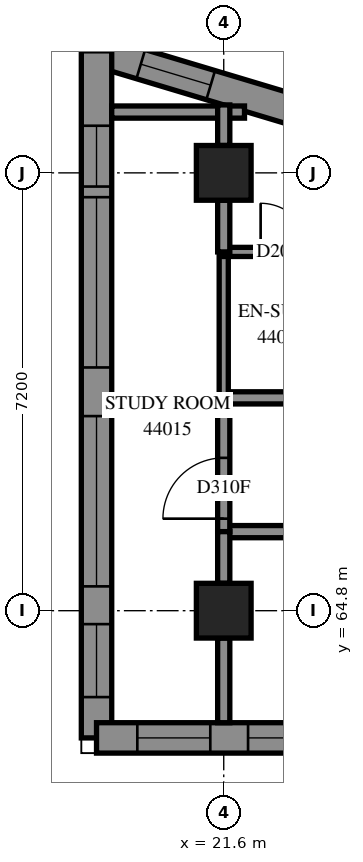
"""IFC4 building model, lengths in metres.
Left out: names, types, materials, properties, quantities, classifications, styles, units other than length and angle.
Written with IfcOpenShell. Run it as: python <this file> out.ifc"""

import sys

from ifc_helpers import new_model, si_unit, direction, frame, frame_2d, origin, origin_2d, place, context, subcontext, project, spatial, polyline, rectangle, outline, extrude, element, fill, save


model = new_model("IFC4")
c1 = context("Model", 3, precision=1e-05, world=origin(), true_north=direction((0.0, 1.0)))
c2 = subcontext(c1, "Body", "Model", "MODEL_VIEW")
j1 = project(units=[si_unit("LENGTHUNIT", "METRE"), si_unit("PLANEANGLEUNIT", "RADIAN")], contexts=[c1])
p1 = place(None, origin())
s1 = spatial("IfcSite", under=j1, at=p1, CompositionType="ELEMENT")
p2 = place(p1, origin())
s2 = spatial("IfcBuilding", under=s1, at=p2, CompositionType="ELEMENT")
p3 = place(p2, frame((0.0, 0.0, 162.6)))
s3 = spatial("IfcBuildingStorey", under=s2, at=p3, CompositionType="ELEMENT", Elevation=162.6)
for number, where, z_axis, x_axis in (
    (1, (21.6, 64.8, 0.0), (0.0, 0.0, 1.0), (1.0, 0.0, 0.0)),
    (2, (21.6, 72.0, 0.0), (0.0, 0.0, 1.0), (1.0, 0.0, 0.0)),
):
    element("IfcColumn", number, at=place(p3, frame(where, z_axis=z_axis, x_axis=x_axis)), inside=s3, PredefinedType="COLUMN", context=c2, shape_type="SweptSolid", body=[
        extrude(rectangle(XDim=0.9, YDim=0.9, at=origin_2d()), origin(), (0.0, 0.0, 1.0), 3.1),
    ])
p4 = place(p3, frame((23.046, 72.945, 0.0), z_axis=(0.0, 0.0, 1.0), x_axis=(-0.9578292658, 0.2873379501, 0.0)))
e3 = element("IfcWall", 3, at=p4, inside=s3, PredefinedType="SOLIDWALL", context=c2, shape_type="SweptSolid", body=[
    extrude(outline(polyline([(0.055, -0.25), (4.03, -0.25), (3.358, 0.25), (-0.055, 0.25), (0.055, -0.25)])), origin(), (0.0, 0.0, 1.0), 3.1),
])
p5 = place(p4, frame((1.734, 0.0, 0.45)))
e4 = element("IfcOpeningElement", 4, at=p5, cuts=e3, PredefinedType="OPENING", context=c2, shape_type="SweptSolid", body=[
    extrude(rectangle(XDim=1.2, YDim=2.5, at=frame_2d((0.6, 1.25))), frame((0.0, 0.26, 0.0), z_axis=(0.0, -1.0, 0.0), x_axis=(1.0, 0.0, 0.0)), (0.0, 0.0, 1.0), 0.52),
])
p6 = place(p3, frame((19.508, 74.006, 0.0), z_axis=(0.0, 0.0, 1.0), x_axis=(0.0, -1.0, 0.0)))
e5 = element("IfcWall", 5, at=p6, inside=s3, PredefinedType="SOLIDWALL", context=c2, shape_type="SweptSolid", body=[
    extrude(outline(polyline([(-0.336, -0.25), (11.548, -0.25), (11.048, 0.25), (0.336, 0.25), (-0.336, -0.25)])), origin(), (0.0, 0.0, 1.0), 3.1),
])
p7 = place(p6, frame((2.406, 0.0, 0.45)))
e6 = element("IfcOpeningElement", 6, at=p7, cuts=e5, PredefinedType="OPENING", context=c2, shape_type="SweptSolid", body=[
    extrude(rectangle(XDim=2.8, YDim=2.5, at=frame_2d((1.4, 1.25))), frame((0.0, 0.26, 0.0), z_axis=(0.0, -1.0, 0.0), x_axis=(1.0, 0.0, 0.0)), (0.0, 0.0, 1.0), 0.52),
])
p8 = place(p6, frame((6.006, 0.0, 0.45)))
e7 = element("IfcOpeningElement", 7, at=p8, cuts=e5, PredefinedType="OPENING", context=c2, shape_type="SweptSolid", body=[
    extrude(rectangle(XDim=2.8, YDim=2.5, at=frame_2d((1.4, 1.25))), frame((0.0, 0.26, 0.0), z_axis=(0.0, -1.0, 0.0), x_axis=(1.0, 0.0, 0.0)), (0.0, 0.0, 1.0), 0.52),
])
p9 = place(p6, frame((9.427, 0.0, 0.45)))
e8 = element("IfcOpeningElement", 8, at=p9, cuts=e5, PredefinedType="OPENING", context=c2, shape_type="SweptSolid", body=[
    extrude(rectangle(XDim=1.2, YDim=2.5, at=frame_2d((0.6, 1.25))), frame((0.0, 0.26, 0.0), z_axis=(0.0, -1.0, 0.0), x_axis=(1.0, 0.0, 0.0)), (0.0, 0.0, 1.0), 0.52),
])
p10 = place(p6, frame((1.231, 0.0, 0.45)))
e9 = element("IfcOpeningElement", 9, at=p10, cuts=e5, PredefinedType="OPENING", context=c2, shape_type="SweptSolid", body=[
    extrude(rectangle(XDim=1.0, YDim=2.5, at=frame_2d((0.5, 1.25))), frame((0.0, 0.26, 0.0), z_axis=(0.0, -1.0, 0.0), x_axis=(1.0, 0.0, 0.0)), (0.0, 0.0, 1.0), 0.52),
])
p11 = place(p3, frame((19.508, 62.708, 0.0), z_axis=(0.0, 0.0, 1.0), x_axis=(1.0, 0.0, 0.0)))
e10 = element("IfcWall", 10, at=p11, inside=s3, PredefinedType="SOLIDWALL", context=c2, shape_type="SweptSolid", body=[
    extrude(outline(polyline([(-0.25, -0.25), (15.292, -0.25), (15.792, 0.25), (0.25, 0.25), (-0.25, -0.25)])), origin(), (0.0, 0.0, 1.0), 3.1),
])
p12 = place(p11, frame((2.492, 0.0, 0.45)))
e11 = element("IfcOpeningElement", 11, at=p12, cuts=e10, PredefinedType="OPENING", context=c2, shape_type="SweptSolid", body=[
    extrude(rectangle(XDim=2.8, YDim=2.5, at=frame_2d((1.4, 1.25))), frame((0.0, 0.26, 0.0), z_axis=(0.0, -1.0, 0.0), x_axis=(1.0, 0.0, 0.0)), (0.0, 0.0, 1.0), 0.52),
])
p13 = place(p11, frame((6.092, 0.0, 0.45)))
e12 = element("IfcOpeningElement", 12, at=p13, cuts=e10, PredefinedType="OPENING", context=c2, shape_type="SweptSolid", body=[
    extrude(rectangle(XDim=2.8, YDim=2.5, at=frame_2d((1.4, 1.25))), frame((0.0, 0.26, 0.0), z_axis=(0.0, -1.0, 0.0), x_axis=(1.0, 0.0, 0.0)), (0.0, 0.0, 1.0), 0.52),
])
p14 = place(p11, frame((9.442, 0.0, 0.45)))
e13 = element("IfcOpeningElement", 13, at=p14, cuts=e10, PredefinedType="OPENING", context=c2, shape_type="SweptSolid", body=[
    extrude(rectangle(XDim=2.8, YDim=2.5, at=frame_2d((1.4, 1.25))), frame((0.0, 0.26, 0.0), z_axis=(0.0, -1.0, 0.0), x_axis=(1.0, 0.0, 0.0)), (0.0, 0.0, 1.0), 0.52),
])
p15 = place(p11, frame((0.671, 0.0, 0.45)))
e14 = element("IfcOpeningElement", 14, at=p15, cuts=e10, PredefinedType="OPENING", context=c2, shape_type="SweptSolid", body=[
    extrude(rectangle(XDim=1.2, YDim=2.5, at=frame_2d((0.6, 1.25))), frame((0.0, 0.26, 0.0), z_axis=(0.0, -1.0, 0.0), x_axis=(1.0, 0.0, 0.0)), (0.0, 0.0, 1.0), 0.52),
])
p16 = place(p11, frame((13.517, 0.0, 0.45)))
e15 = element("IfcOpeningElement", 15, at=p16, cuts=e10, PredefinedType="OPENING", context=c2, shape_type="SweptSolid", body=[
    extrude(rectangle(XDim=1.2, YDim=2.5, at=frame_2d((0.6, 1.25))), frame((0.0, 0.26, 0.0), z_axis=(0.0, -1.0, 0.0), x_axis=(1.0, 0.0, 0.0)), (0.0, 0.0, 1.0), 0.52),
])
p17 = place(p3, frame((21.6, 68.3, 0.0), z_axis=(0.0, 0.0, 1.0), x_axis=(1.0, 0.0, 0.0)))
e16 = element("IfcWall", 16, at=p17, inside=s3, PredefinedType="PARTITIONING", context=c2, shape_type="SweptSolid", body=[
    extrude(rectangle(XDim=19.1, YDim=0.2, at=frame_2d((9.55, 0.0))), origin(), (0.0, 0.0, 1.0), 3.1),
])
p18 = place(p17, frame((3.899, 0.0, 0.0)))
e17 = element("IfcOpeningElement", 17, at=p18, cuts=e16, PredefinedType="OPENING", context=c2, shape_type="SweptSolid", body=[
    extrude(rectangle(XDim=0.9, YDim=2.1, at=frame_2d((0.45, 1.05))), frame((0.0, 0.11, 0.0), z_axis=(0.0, -1.0, 0.0), x_axis=(1.0, 0.0, 0.0)), (0.0, 0.0, 1.0), 0.22),
])
p19 = place(p17, frame((11.099, 0.0, 0.0)))
e18 = element("IfcOpeningElement", 18, at=p19, cuts=e16, PredefinedType="OPENING", context=c2, shape_type="SweptSolid", body=[
    extrude(rectangle(XDim=0.9, YDim=2.1, at=frame_2d((0.45, 1.05))), frame((0.0, 0.11, 0.0), z_axis=(0.0, -1.0, 0.0), x_axis=(1.0, 0.0, 0.0)), (0.0, 0.0, 1.0), 0.22),
])
p20 = place(p17, frame((16.7, 0.0, 0.0)))
e19 = element("IfcOpeningElement", 19, at=p20, cuts=e16, PredefinedType="OPENING", context=c2, shape_type="SweptSolid", body=[
    extrude(rectangle(XDim=0.9, YDim=2.1, at=frame_2d((0.45, 1.05))), frame((0.0, 0.11, 0.0), z_axis=(0.0, -1.0, 0.0), x_axis=(1.0, 0.0, 0.0)), (0.0, 0.0, 1.0), 0.22),
])
p21 = place(p3, frame((21.6, 66.1, 0.0), z_axis=(0.0, 0.0, 1.0), x_axis=(1.0, 0.0, 0.0)))
e20 = element("IfcWall", 20, at=p21, inside=s3, PredefinedType="PARTITIONING", context=c2, shape_type="SweptSolid", body=[
    extrude(rectangle(XDim=16.9, YDim=0.2, at=frame_2d((8.45, 0.0))), origin(), (0.0, 0.0, 1.0), 3.1),
])
p22 = place(p21, frame((12.493, 0.0, 0.0)))
e21 = element("IfcOpeningElement", 21, at=p22, cuts=e20, PredefinedType="OPENING", context=c2, shape_type="SweptSolid", body=[
    extrude(rectangle(XDim=1.0, YDim=2.1, at=frame_2d((0.5, 1.05))), frame((0.0, 0.11, 0.0), z_axis=(0.0, -1.0, 0.0), x_axis=(1.0, 0.0, 0.0)), (0.0, 0.0, 1.0), 0.22),
])
p23 = place(p3, frame((21.6, 68.3, 0.0), z_axis=(0.0, 0.0, 1.0), x_axis=(0.0, 1.0, 0.0)))
e22 = element("IfcWall", 22, at=p23, inside=s3, PredefinedType="PARTITIONING", context=c2, shape_type="SweptSolid", body=[
    extrude(rectangle(XDim=2.4, YDim=0.15, at=frame_2d((1.2, 0.0))), origin(), (0.0, 0.0, 1.0), 2.6),
])
p24 = place(p3, frame((21.6, 66.1, 0.0), z_axis=(0.0, 0.0, 1.0), x_axis=(0.0, 1.0, 0.0)))
e23 = element("IfcWall", 23, at=p24, inside=s3, PredefinedType="PARTITIONING", context=c2, shape_type="SweptSolid", body=[
    extrude(rectangle(XDim=2.2, YDim=0.2, at=frame_2d((1.1, 0.0))), origin(), (0.0, 0.0, 1.0), 2.6),
])
p25 = place(p24, frame((0.213, 0.0, 0.0)))
e24 = element("IfcOpeningElement", 24, at=p25, cuts=e23, PredefinedType="OPENING", context=c2, shape_type="SweptSolid", body=[
    extrude(rectangle(XDim=1.0, YDim=2.1, at=frame_2d((0.5, 1.05))), frame((0.0, 0.11, 0.0), z_axis=(0.0, -1.0, 0.0), x_axis=(1.0, 0.0, 0.0)), (0.0, 0.0, 1.0), 0.22),
])
p26 = place(p3, frame((19.758, 73.0, 0.0), z_axis=(0.0, 0.0, 1.0), x_axis=(1.0, 0.0, 0.0)))
e25 = element("IfcWall", 25, at=p26, inside=s3, PredefinedType="PARTITIONING", context=c2, shape_type="SweptSolid", body=[
    extrude(rectangle(XDim=2.183, YDim=0.2, at=frame_2d((1.092, 0.0))), origin(), (0.0, 0.0, 1.0), 3.1),
])
p27 = place(p3, frame((21.6, 70.7, 0.0), z_axis=(0.0, 0.0, 1.0), x_axis=(1.0, 0.0, 0.0)))
e26 = element("IfcWall", 26, at=p27, inside=s3, PredefinedType="PARTITIONING", context=c2, shape_type="SweptSolid", body=[
    extrude(rectangle(XDim=1.9, YDim=0.15, at=frame_2d((0.95, 0.0))), origin(), (0.0, 0.0, 1.0), 3.1),
])
p28 = place(p27, frame((0.607, 0.0, 0.0)))
e27 = element("IfcOpeningElement", 27, at=p28, cuts=e26, PredefinedType="OPENING", context=c2, shape_type="SweptSolid", body=[
    extrude(rectangle(XDim=0.8, YDim=2.1, at=frame_2d((0.4, 1.05))), frame((0.0, 0.085, 0.0), z_axis=(0.0, -1.0, 0.0), x_axis=(1.0, 0.0, 0.0)), (0.0, 0.0, 1.0), 0.17),
])
p29 = place(p3, frame((21.6, 62.958, 0.0), z_axis=(0.0, 0.0, 1.0), x_axis=(0.0, 1.0, 0.0)))
e28 = element("IfcWall", 28, at=p29, inside=s3, PredefinedType="PARTITIONING", context=c2, shape_type="SweptSolid", body=[
    extrude(rectangle(XDim=1.392, YDim=0.2, at=frame_2d((0.696, 0.0))), origin(), (0.0, 0.0, 1.0), 3.1),
])
for number, where, z_axis, x_axis in (
    (29, (21.6, 65.25, 0.0), (0.0, 0.0, 1.0), (0.0, 1.0, 0.0)),
    (30, (21.6, 70.7, 0.0), (0.0, 0.0, 1.0), (0.0, 1.0, 0.0)),
):
    element("IfcWall", number, at=place(p3, frame(where, z_axis=z_axis, x_axis=x_axis)), inside=s3, PredefinedType="PARTITIONING", context=c2, shape_type="SweptSolid", body=[
        extrude(rectangle(XDim=0.85, YDim=0.2, at=frame_2d((0.425, 0.0))), origin(), (0.0, 0.0, 1.0), 2.6),
    ])
p30 = place(p3, frame((21.6, 72.45, 0.0), z_axis=(0.0, 0.0, 1.0), x_axis=(0.0, 1.0, 0.0)))
e31 = element("IfcWall", 31, at=p30, inside=s3, PredefinedType="PARTITIONING", context=c2, shape_type="SweptSolid", body=[
    extrude(rectangle(XDim=0.667, YDim=0.2, at=frame_2d((0.334, 0.0))), origin(), (0.0, 0.0, 1.0), 3.1),
])
p31 = place(p5, origin())
e32 = element("IfcWindow", 32, at=p31, inside=s3, PartitioningType="SINGLE_PANEL", PredefinedType="WINDOW", context=c2, shape_type="SweptSolid", body=[
    extrude(rectangle(XDim=1.2, YDim=2.5, at=frame_2d((0.6, 1.25))), frame((0.0, 0.18, 0.0), z_axis=(0.0, -1.0, 0.0), x_axis=(1.0, 0.0, 0.0)), (0.0, 0.0, 1.0), 0.06),
])
fill(e4, e32)
p32 = place(p7, origin())
e33 = element("IfcWindow", 33, at=p32, inside=s3, PartitioningType="SINGLE_PANEL", PredefinedType="WINDOW", context=c2, shape_type="SweptSolid", body=[
    extrude(rectangle(XDim=2.8, YDim=2.5, at=frame_2d((1.4, 1.25))), frame((0.0, 0.18, 0.0), z_axis=(0.0, -1.0, 0.0), x_axis=(1.0, 0.0, 0.0)), (0.0, 0.0, 1.0), 0.06),
])
fill(e6, e33)
p33 = place(p8, origin())
e34 = element("IfcWindow", 34, at=p33, inside=s3, PartitioningType="SINGLE_PANEL", PredefinedType="WINDOW", context=c2, shape_type="SweptSolid", body=[
    extrude(rectangle(XDim=2.8, YDim=2.5, at=frame_2d((1.4, 1.25))), frame((0.0, 0.18, 0.0), z_axis=(0.0, -1.0, 0.0), x_axis=(1.0, 0.0, 0.0)), (0.0, 0.0, 1.0), 0.06),
])
fill(e7, e34)
p34 = place(p9, origin())
e35 = element("IfcWindow", 35, at=p34, inside=s3, PartitioningType="SINGLE_PANEL", PredefinedType="WINDOW", context=c2, shape_type="SweptSolid", body=[
    extrude(rectangle(XDim=1.2, YDim=2.5, at=frame_2d((0.6, 1.25))), frame((0.0, 0.18, 0.0), z_axis=(0.0, -1.0, 0.0), x_axis=(1.0, 0.0, 0.0)), (0.0, 0.0, 1.0), 0.06),
])
fill(e8, e35)
p35 = place(p12, origin())
e36 = element("IfcWindow", 36, at=p35, inside=s3, PartitioningType="SINGLE_PANEL", PredefinedType="WINDOW", context=c2, shape_type="SweptSolid", body=[
    extrude(rectangle(XDim=2.8, YDim=2.5, at=frame_2d((1.4, 1.25))), frame((0.0, 0.18, 0.0), z_axis=(0.0, -1.0, 0.0), x_axis=(1.0, 0.0, 0.0)), (0.0, 0.0, 1.0), 0.06),
])
fill(e11, e36)
p36 = place(p15, origin())
e37 = element("IfcWindow", 37, at=p36, inside=s3, PartitioningType="SINGLE_PANEL", PredefinedType="WINDOW", context=c2, shape_type="SweptSolid", body=[
    extrude(rectangle(XDim=1.2, YDim=2.5, at=frame_2d((0.6, 1.25))), frame((0.0, 0.18, 0.0), z_axis=(0.0, -1.0, 0.0), x_axis=(1.0, 0.0, 0.0)), (0.0, 0.0, 1.0), 0.06),
])
fill(e14, e37)
p37 = place(p25, origin())
e38 = element("IfcDoor", 38, at=p37, inside=s3, OperationType="SINGLE_SWING_LEFT", PredefinedType="DOOR", context=c2, shape_type="SweptSolid", body=[
    extrude(rectangle(XDim=1.0, YDim=2.1, at=frame_2d((0.5, 1.05))), frame((0.0, 0.025, 0.0), z_axis=(0.0, -1.0, 0.0), x_axis=(1.0, 0.0, 0.0)), (0.0, 0.0, 1.0), 0.05),
])
fill(e24, e38)
p38 = place(p28, origin())
e39 = element("IfcDoor", 39, at=p38, inside=s3, OperationType="SINGLE_SWING_RIGHT", PredefinedType="DOOR", context=c2, shape_type="SweptSolid", body=[
    extrude(rectangle(XDim=0.8, YDim=2.1, at=frame_2d((0.4, 1.05))), frame((0.0, 0.025, 0.0), z_axis=(0.0, -1.0, 0.0), x_axis=(1.0, 0.0, 0.0)), (0.0, 0.0, 1.0), 0.05),
])
fill(e27, e39)
p39 = place(p10, origin())
e40 = element("IfcWindow", 40, at=p39, inside=s3, PartitioningType="SINGLE_PANEL", PredefinedType="WINDOW", context=c2, shape_type="SweptSolid", body=[
    extrude(rectangle(XDim=1.0, YDim=2.5, at=frame_2d((0.5, 1.25))), frame((0.0, 0.18, 0.0), z_axis=(0.0, -1.0, 0.0), x_axis=(1.0, 0.0, 0.0)), (0.0, 0.0, 1.0), 0.06),
])
fill(e9, e40)
save(model, sys.argv[1])
